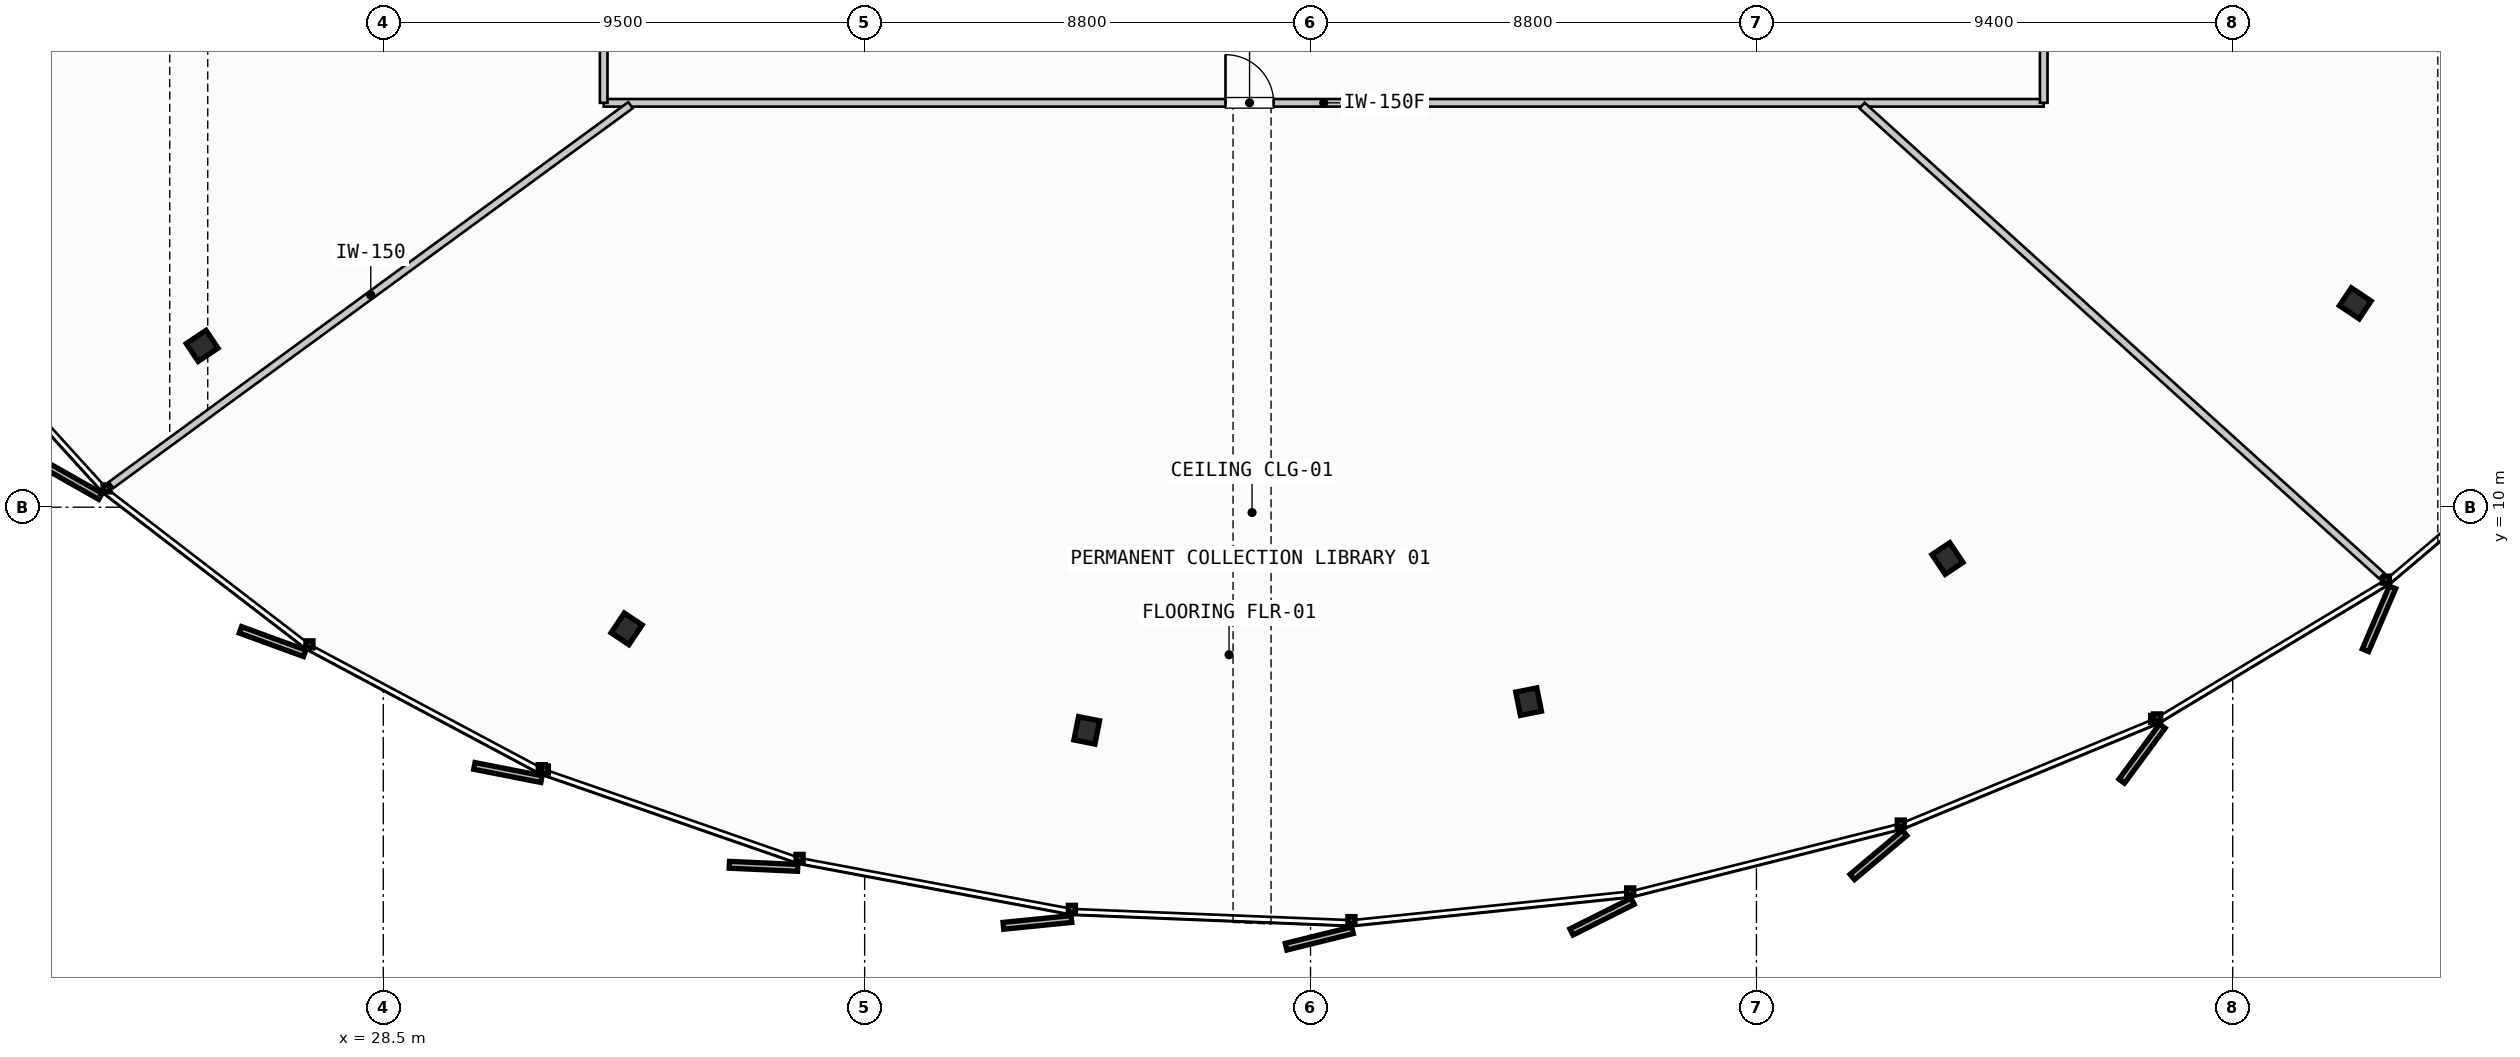
"""IFC4 building model, lengths in metres.
Left out: names, types, materials, properties, quantities, classifications, styles, units other than length and angle.
Written with IfcOpenShell. Run it as: python <this file> out.ifc"""

import sys

from ifc_helpers import new_model, si_unit, direction, frame, frame_2d, origin, origin_2d, place, context, subcontext, project, spatial, rectangle, i_section, extrude, source, transform, mapped, element, fill, save


model = new_model("IFC4")
c1 = context("Model", 3, precision=1e-05, world=origin(), true_north=direction((0.0, 1.0)))
c2 = subcontext(c1, "Body", "Model", "MODEL_VIEW")
j1 = project(units=[si_unit("LENGTHUNIT", "METRE"), si_unit("PLANEANGLEUNIT", "RADIAN")], contexts=[c1])
p1 = place(None, origin())
s1 = spatial("IfcSite", under=j1, at=p1, CompositionType="ELEMENT")
p2 = place(p1, origin())
s2 = spatial("IfcBuilding", under=s1, at=p2, CompositionType="ELEMENT")
p3 = place(p2, frame((0.0, 0.0, 37.2)))
s3 = spatial("IfcBuildingStorey", under=s2, at=p3, CompositionType="ELEMENT", Elevation=37.2)
m1 = source(origin(), c2, "Body", "SweptSolid", [
    extrude(i_section(OverallWidth=0.423, OverallDepth=0.469, WebThickness=0.051, FlangeThickness=0.081, FilletRadius=0.015, at=origin_2d()), origin(), (0.0, 0.0, 1.0), 3.55),
])
for number, where, z_axis, x_axis in (
    (1, (24.925, 13.183, 0.0), (0.0, 0.0, 1.0), (-0.831, -0.556, 0.0)),
    (2, (33.302, 7.599, 0.0), (0.0, 0.0, 1.0), (-0.556, -0.831, 0.0)),
    (3, (42.383, 5.596, 0.0), (0.0, 0.0, 1.0), (-0.195, -0.981, 0.0)),
    (4, (51.104, 6.163, 0.0), (0.0, 0.0, 1.0), (0.195, -0.981, 0.0)),
    (5, (59.37, 8.987, 0.0), (0.0, 0.0, 1.0), (0.556, -0.831, 0.0)),
    (6, (67.418, 14.023, 0.0), (0.0, 0.0, 1.0), (0.831, -0.556, 0.0)),
):
    element("IfcColumn", number, at=place(p3, frame(where, z_axis=z_axis, x_axis=x_axis)), inside=s3, PredefinedType="COLUMN", context=c2, shape_type="MappedRepresentation", body=[
        mapped(m1, transform((0.0, 0.0, 0.0), scale=1.0)),
    ])
p4 = place(p3, frame((32.85, 17.98, 0.0), z_axis=(0.0, 0.0, 1.0), x_axis=(1.0, 0.0, 0.0)))
e7 = element("IfcWall", 7, at=p4, inside=s3, PredefinedType="PARTITIONING", context=c2, shape_type="SweptSolid", body=[
    extrude(rectangle(XDim=28.42, YDim=0.15, at=frame_2d((14.21, 0.0))), origin(), (0.0, 0.0, 1.0), 2.925),
])
p5 = place(p4, frame((12.271, 0.0, 0.0)))
e8 = element("IfcOpeningElement", 8, at=p5, cuts=e7, PredefinedType="OPENING", context=c2, shape_type="SweptSolid", body=[
    extrude(rectangle(XDim=0.95, YDim=2.15, at=frame_2d((0.475, 1.075))), frame((0.0, 0.085, 0.0), z_axis=(0.0, -1.0, 0.0), x_axis=(1.0, 0.0, 0.0)), (0.0, 0.0, 1.0), 0.17),
])
p6 = place(p3, frame((61.27, 17.98, 0.0), z_axis=(0.0, 0.0, 1.0), x_axis=(0.0, 1.0, 0.0)))
e9 = element("IfcWall", 9, at=p6, inside=s3, PredefinedType="PARTITIONING", context=c2, shape_type="SweptSolid", body=[
    extrude(rectangle(XDim=20.06, YDim=0.15, at=frame_2d((10.03, 0.0))), origin(), (0.0, 0.0, 1.0), 2.925),
])
p7 = place(p6, frame((9.555, 0.0, 0.0)))
e10 = element("IfcOpeningElement", 10, at=p7, cuts=e9, PredefinedType="OPENING", context=c2, shape_type="SweptSolid", body=[
    extrude(rectangle(XDim=0.95, YDim=2.15, at=frame_2d((0.475, 1.075))), frame((0.0, 0.085, 0.0), z_axis=(0.0, -1.0, 0.0), x_axis=(1.0, 0.0, 0.0)), (0.0, 0.0, 1.0), 0.17),
])
p8 = place(p3, frame((32.85, 38.04, 0.0), z_axis=(0.0, 0.0, 1.0), x_axis=(0.0, -1.0, 0.0)))
e11 = element("IfcWall", 11, at=p8, inside=s3, PredefinedType="PARTITIONING", context=c2, shape_type="SweptSolid", body=[
    extrude(rectangle(XDim=20.06, YDim=0.15, at=frame_2d((10.03, 0.0))), origin(), (0.0, 0.0, 1.0), 2.925),
])
p9 = place(p8, frame((9.555, 0.0, 0.0)))
e12 = element("IfcOpeningElement", 12, at=p9, cuts=e11, PredefinedType="OPENING", context=c2, shape_type="SweptSolid", body=[
    extrude(rectangle(XDim=0.95, YDim=2.15, at=frame_2d((0.475, 1.075))), frame((0.0, 0.085, 0.0), z_axis=(0.0, -1.0, 0.0), x_axis=(1.0, 0.0, 0.0)), (0.0, 0.0, 1.0), 0.17),
])
p10 = place(p3, frame((33.378, 17.933, 0.0), z_axis=(0.0, 0.0, 1.0), x_axis=(-0.807215314331, -0.5902570934, 0.0)))
e13 = element("IfcWall", 13, at=p10, inside=s3, PredefinedType="PARTITIONING", context=c2, shape_type="SweptSolid", body=[
    extrude(rectangle(XDim=12.699, YDim=0.15, at=frame_2d((6.35, 0.0))), origin(), (0.0, 0.0, 1.0), 2.925),
])
p11 = place(p3, frame((57.686, 17.926, 0.0), z_axis=(0.0, 0.0, 1.0), x_axis=(0.741441271634, -0.67101776483, 0.0)))
e14 = element("IfcWall", 14, at=p11, inside=s3, PredefinedType="PARTITIONING", context=c2, shape_type="SweptSolid", body=[
    extrude(rectangle(XDim=13.832, YDim=0.15, at=frame_2d((6.916, 0.0))), origin(), (0.0, 0.0, 1.0), 2.925),
])
m2 = source(origin(), c2, "Body", "SweptSolid", [
    extrude(rectangle(XDim=0.95, YDim=2.15, at=frame_2d((0.475, 1.075))), frame((0.0, 0.025, 0.0), z_axis=(0.0, -1.0, 0.0), x_axis=(1.0, 0.0, 0.0)), (0.0, 0.0, 1.0), 0.05),
])
p12 = place(p5, origin())
e15 = element("IfcDoor", 15, at=p12, inside=s3, OperationType="SINGLE_SWING_LEFT", PredefinedType="DOOR", context=c2, shape_type="MappedRepresentation", body=[
    mapped(m2, transform((0.0, 0.0, 0.0), scale=1.0)),
])
fill(e8, e15)
save(model, sys.argv[1])
